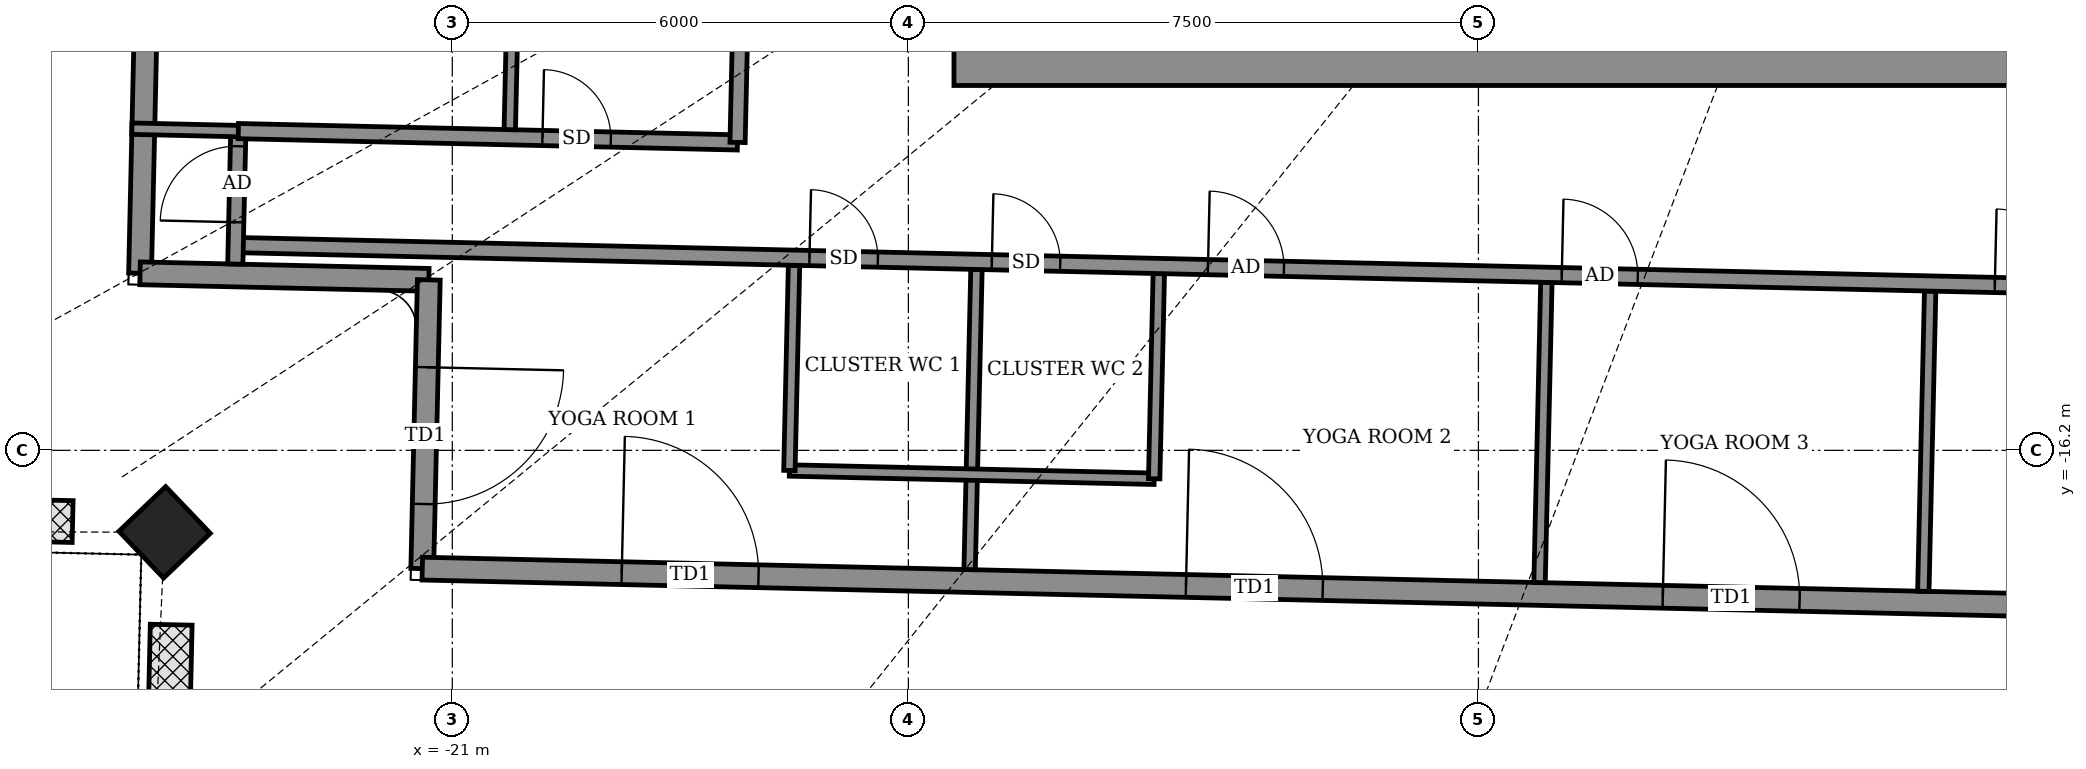
"""IFC4 building model, lengths in metres.
Left out: names, types, materials, properties, quantities, classifications, styles, units other than length and angle.
Written with IfcOpenShell. Run it as: python <this file> out.ifc"""

import sys

from ifc_helpers import new_model, si_unit, direction, frame, frame_2d, origin, origin_2d, place, context, subcontext, project, spatial, rectangle, extrude, element, fill, save


model = new_model("IFC4")
c1 = context("Model", 3, precision=1e-05, world=origin(), true_north=direction((0.0, 1.0)))
c2 = subcontext(c1, "Body", "Model", "MODEL_VIEW")
j1 = project(units=[si_unit("LENGTHUNIT", "METRE"), si_unit("PLANEANGLEUNIT", "RADIAN")], contexts=[c1])
p1 = place(None, origin())
s1 = spatial("IfcSite", under=j1, at=p1, CompositionType="ELEMENT")
p2 = place(p1, origin())
s2 = spatial("IfcBuilding", under=s1, at=p2, CompositionType="ELEMENT")
p3 = place(p2, frame((0.0, 0.0, 337.9)))
s3 = spatial("IfcBuildingStorey", under=s2, at=p3, CompositionType="ELEMENT", Elevation=337.9)
p4 = place(p3, frame((-24.785, -17.278, -0.55), z_axis=(0.0, 0.0, 1.0), x_axis=(0.690837236726, -0.723010312757, 0.0)))
e1 = element("IfcColumn", 1, at=p4, inside=s3, PredefinedType="COLUMN", context=c2, shape_type="SweptSolid", body=[
    extrude(rectangle(XDim=0.85, YDim=0.85, at=origin_2d()), origin(), (0.0, 0.0, 1.0), 4.6),
])
p5 = place(p3, frame((-24.899, -4.644, 0.0), z_axis=(0.0, 0.0, 1.0), x_axis=(-0.022643290689, -0.999743607825, 0.0)))
e2 = element("IfcWall", 2, at=p5, inside=s3, PredefinedType="SOLIDWALL", context=c2, shape_type="SweptSolid", body=[
    extrude(rectangle(XDim=9.229, YDim=0.3, at=frame_2d((4.615, 0.0))), origin(), (0.0, 0.0, 1.0), 2.45),
])
p6 = place(p5, frame((2.792, 0.0, 0.0)))
e3 = element("IfcOpeningElement", 3, at=p6, cuts=e2, PredefinedType="OPENING", context=c2, shape_type="SweptSolid", body=[
    extrude(rectangle(XDim=1.8, YDim=2.4, at=frame_2d((0.9, 1.2))), frame((0.0, 0.16, 0.0), z_axis=(0.0, -1.0, 0.0), x_axis=(1.0, 0.0, 0.0)), (0.0, 0.0, 1.0), 0.32),
])
p7 = place(p3, frame((-25.108, -13.871, 0.0), z_axis=(0.0, 0.0, 1.0), x_axis=(0.999744218285, -0.022616321648, 0.0)))
e4 = element("IfcWall", 4, at=p7, inside=s3, PredefinedType="SOLIDWALL", context=c2, shape_type="SweptSolid", body=[
    extrude(rectangle(XDim=3.8, YDim=0.3, at=frame_2d((1.9, 0.0))), origin(), (0.0, 0.0, 1.0), 2.45),
])
p8 = place(p3, frame((-21.309, -13.957, 0.0), z_axis=(0.0, 0.0, 1.0), x_axis=(-0.022614868993, -0.999744251146, 0.0)))
e5 = element("IfcWall", 5, at=p8, inside=s3, PredefinedType="SOLIDWALL", context=c2, shape_type="SweptSolid", body=[
    extrude(rectangle(XDim=3.8, YDim=0.3, at=frame_2d((1.9, 0.0))), origin(), (0.0, 0.0, 1.0), 2.65),
])
p9 = place(p8, frame((1.15, 0.0, 0.0)))
e6 = element("IfcOpeningElement", 6, at=p9, cuts=e5, PredefinedType="OPENING", context=c2, shape_type="SweptSolid", body=[
    extrude(rectangle(XDim=1.8, YDim=2.4, at=frame_2d((0.9, 1.2))), frame((0.0, 0.16, 0.0), z_axis=(0.0, -1.0, 0.0), x_axis=(1.0, 0.0, 0.0)), (0.0, 0.0, 1.0), 0.32),
])
p10 = place(p3, frame((-21.395, -17.756, 0.0), z_axis=(0.0, 0.0, 1.0), x_axis=(0.999742664636, -0.022684895998, 0.0)))
e7 = element("IfcWall", 7, at=p10, inside=s3, PredefinedType="SOLIDWALL", context=c2, shape_type="SweptSolid", body=[
    extrude(rectangle(XDim=43.899, YDim=0.3, at=frame_2d((21.95, 0.0))), origin(), (0.0, 0.0, 1.0), 2.65),
])
p11 = place(p10, frame((2.625, 0.0, 0.0)))
e8 = element("IfcOpeningElement", 8, at=p11, cuts=e7, PredefinedType="OPENING", context=c2, shape_type="SweptSolid", body=[
    extrude(rectangle(XDim=1.8, YDim=2.4, at=frame_2d((0.9, 1.2))), frame((0.0, 0.16, 0.0), z_axis=(0.0, -1.0, 0.0), x_axis=(1.0, 0.0, 0.0)), (0.0, 0.0, 1.0), 0.32),
])
p12 = place(p10, frame((10.05, 0.0, 0.0)))
e9 = element("IfcOpeningElement", 9, at=p12, cuts=e7, PredefinedType="OPENING", context=c2, shape_type="SweptSolid", body=[
    extrude(rectangle(XDim=1.8, YDim=2.4, at=frame_2d((0.9, 1.2))), frame((0.0, 0.16, 0.0), z_axis=(0.0, -1.0, 0.0), x_axis=(1.0, 0.0, 0.0)), (0.0, 0.0, 1.0), 0.32),
])
p13 = place(p10, frame((16.325, 0.0, 0.0)))
e10 = element("IfcOpeningElement", 10, at=p13, cuts=e7, PredefinedType="OPENING", context=c2, shape_type="SweptSolid", body=[
    extrude(rectangle(XDim=1.8, YDim=2.4, at=frame_2d((0.9, 1.2))), frame((0.0, 0.16, 0.0), z_axis=(0.0, -1.0, 0.0), x_axis=(1.0, 0.0, 0.0)), (0.0, 0.0, 1.0), 0.32),
])
p14 = place(p10, frame((22.15, 0.0, 0.0)))
e11 = element("IfcOpeningElement", 11, at=p14, cuts=e7, PredefinedType="OPENING", context=c2, shape_type="SweptSolid", body=[
    extrude(rectangle(XDim=1.8, YDim=2.4, at=frame_2d((0.9, 1.2))), frame((0.0, 0.16, 0.0), z_axis=(0.0, -1.0, 0.0), x_axis=(1.0, 0.0, 0.0)), (0.0, 0.0, 1.0), 0.32),
])
p15 = place(p10, frame((28.35, 0.0, 0.0)))
e12 = element("IfcOpeningElement", 12, at=p15, cuts=e7, PredefinedType="OPENING", context=c2, shape_type="SweptSolid", body=[
    extrude(rectangle(XDim=1.8, YDim=2.4, at=frame_2d((0.9, 1.2))), frame((0.0, 0.16, 0.0), z_axis=(0.0, -1.0, 0.0), x_axis=(1.0, 0.0, 0.0)), (0.0, 0.0, 1.0), 0.32),
])
p16 = place(p10, frame((34.075, 0.0, 0.0)))
e13 = element("IfcOpeningElement", 13, at=p16, cuts=e7, PredefinedType="OPENING", context=c2, shape_type="SweptSolid", body=[
    extrude(rectangle(XDim=1.8, YDim=2.4, at=frame_2d((0.9, 1.2))), frame((0.0, 0.16, 0.0), z_axis=(0.0, -1.0, 0.0), x_axis=(1.0, 0.0, 0.0)), (0.0, 0.0, 1.0), 0.32),
])
p17 = place(p10, frame((39.6, 0.0, 0.0)))
e14 = element("IfcOpeningElement", 14, at=p17, cuts=e7, PredefinedType="OPENING", context=c2, shape_type="SweptSolid", body=[
    extrude(rectangle(XDim=1.8, YDim=2.4, at=frame_2d((0.9, 1.2))), frame((0.0, 0.16, 0.0), z_axis=(0.0, -1.0, 0.0), x_axis=(1.0, 0.0, 0.0)), (0.0, 0.0, 1.0), 0.32),
])
p18 = place(p3, frame((-24.734, -20.081, 0.0), z_axis=(0.0, 0.0, 1.0), x_axis=(0.022606127362, 0.99974444885, 0.0)))
e15 = element("IfcWall", 15, at=p18, inside=s3, PredefinedType="USERDEFINED", context=c2, shape_type="SweptSolid", body=[
    extrude(rectangle(XDim=1.588, YDim=0.55, at=frame_2d((0.794, 0.0))), origin(), (0.0, 0.0, 1.0), 0.8),
])
p19 = place(p3, frame((-25.995, -17.137, 0.0), z_axis=(0.0, 0.0, 1.0), x_axis=(-0.999742081457, 0.022710582629, 0.0)))
e16 = element("IfcWall", 16, at=p19, inside=s3, PredefinedType="USERDEFINED", context=c2, shape_type="SweptSolid", body=[
    extrude(rectangle(XDim=1.537, YDim=0.55, at=frame_2d((0.769, 0.0))), origin(), (0.0, 0.0, 1.0), 0.8),
])
p20 = place(p3, frame((-14.194, -17.769, 0.0), z_axis=(0.0, 0.0, 1.0), x_axis=(0.022807049009, 0.999739885428, 0.0)))
e17 = element("IfcWall", 17, at=p20, inside=s3, PredefinedType="PARTITIONING", context=c2, shape_type="SweptSolid", body=[
    extrude(rectangle(XDim=3.95, YDim=0.15, at=frame_2d((1.975, 0.0))), origin(), (0.0, 0.0, 1.0), 2.85),
])
p21 = place(p3, frame((-6.696, -17.94, 0.0), z_axis=(0.0, 0.0, 1.0), x_axis=(0.022801413262, 0.99974001398, 0.0)))
e18 = element("IfcWall", 18, at=p21, inside=s3, PredefinedType="PARTITIONING", context=c2, shape_type="SweptSolid", body=[
    extrude(rectangle(XDim=3.951, YDim=0.15, at=frame_2d((1.976, 0.0))), origin(), (0.0, 0.0, 1.0), 2.85),
])
p22 = place(p3, frame((-1.647, -18.054, 0.0), z_axis=(0.0, 0.0, 1.0), x_axis=(0.022807049009, 0.999739885428, 0.0)))
e19 = element("IfcWall", 19, at=p22, inside=s3, PredefinedType="PARTITIONING", context=c2, shape_type="SweptSolid", body=[
    extrude(rectangle(XDim=3.95, YDim=0.15, at=frame_2d((1.975, 0.0))), origin(), (0.0, 0.0, 1.0), 4.05),
])
p23 = place(p3, frame((-16.565, -16.465, 0.0), z_axis=(0.0, 0.0, 1.0), x_axis=(0.999742675121, -0.022684433919, 0.0)))
e20 = element("IfcWall", 20, at=p23, inside=s3, PredefinedType="PARTITIONING", context=c2, shape_type="SweptSolid", body=[
    extrude(rectangle(XDim=4.8, YDim=0.15, at=frame_2d((2.4, 0.0))), origin(), (0.0, 0.0, 1.0), 2.85),
])
p24 = place(p3, frame((-16.565, -16.465, 0.0), z_axis=(0.0, 0.0, 1.0), x_axis=(0.02260842146, 0.999744396973, 0.0)))
e21 = element("IfcWall", 21, at=p24, inside=s3, PredefinedType="PARTITIONING", context=c2, shape_type="SweptSolid", body=[
    extrude(rectangle(XDim=2.7, YDim=0.15, at=frame_2d((1.35, 0.0))), origin(), (0.0, 0.0, 1.0), 2.65),
])
p25 = place(p3, frame((-11.766, -16.574, 0.0), z_axis=(0.0, 0.0, 1.0), x_axis=(0.02260842146, 0.999744396973, 0.0)))
e22 = element("IfcWall", 22, at=p25, inside=s3, PredefinedType="PARTITIONING", context=c2, shape_type="SweptSolid", body=[
    extrude(rectangle(XDim=2.7, YDim=0.15, at=frame_2d((1.35, 0.0))), origin(), (0.0, 0.0, 1.0), 2.85),
])
p26 = place(p3, frame((-23.849, -13.499, 0.0), z_axis=(0.0, 0.0, 1.0), x_axis=(0.999742429398, -0.022695260756, 0.0)))
e23 = element("IfcWall", 23, at=p26, inside=s3, PredefinedType="PARTITIONING", context=c2, shape_type="SweptSolid", body=[
    extrude(rectangle(XDim=49.0, YDim=0.2, at=frame_2d((24.5, 0.0))), origin(), (0.0, 0.0, 1.0), 2.45),
])
p27 = place(p26, frame((7.55, 0.0, 0.0)))
e24 = element("IfcOpeningElement", 24, at=p27, cuts=e23, PredefinedType="OPENING", context=c2, shape_type="SweptSolid", body=[
    extrude(rectangle(XDim=0.9, YDim=2.1, at=frame_2d((0.45, 1.05))), frame((0.0, 0.11, 0.0), z_axis=(0.0, -1.0, 0.0), x_axis=(1.0, 0.0, 0.0)), (0.0, 0.0, 1.0), 0.22),
])
p28 = place(p26, frame((12.794, 0.0, 0.0)))
e25 = element("IfcOpeningElement", 25, at=p28, cuts=e23, PredefinedType="OPENING", context=c2, shape_type="SweptSolid", body=[
    extrude(rectangle(XDim=1.0, YDim=2.1, at=frame_2d((0.5, 1.05))), frame((0.0, 0.11, 0.0), z_axis=(0.0, -1.0, 0.0), x_axis=(1.0, 0.0, 0.0)), (0.0, 0.0, 1.0), 0.22),
])
p29 = place(p26, frame((9.95, 0.0, 0.0)))
e26 = element("IfcOpeningElement", 26, at=p29, cuts=e23, PredefinedType="OPENING", context=c2, shape_type="SweptSolid", body=[
    extrude(rectangle(XDim=0.9, YDim=2.1, at=frame_2d((0.45, 1.05))), frame((0.0, 0.11, 0.0), z_axis=(0.0, -1.0, 0.0), x_axis=(1.0, 0.0, 0.0)), (0.0, 0.0, 1.0), 0.22),
])
p30 = place(p26, frame((17.45, 0.0, 0.0)))
e27 = element("IfcOpeningElement", 27, at=p30, cuts=e23, PredefinedType="OPENING", context=c2, shape_type="SweptSolid", body=[
    extrude(rectangle(XDim=1.0, YDim=2.1, at=frame_2d((0.5, 1.05))), frame((0.0, 0.11, 0.0), z_axis=(0.0, -1.0, 0.0), x_axis=(1.0, 0.0, 0.0)), (0.0, 0.0, 1.0), 0.22),
])
p31 = place(p26, frame((23.149, 0.0, 0.0)))
e28 = element("IfcOpeningElement", 28, at=p31, cuts=e23, PredefinedType="OPENING", context=c2, shape_type="SweptSolid", body=[
    extrude(rectangle(XDim=1.0, YDim=2.1, at=frame_2d((0.5, 1.05))), frame((0.0, 0.11, 0.0), z_axis=(0.0, -1.0, 0.0), x_axis=(1.0, 0.0, 0.0)), (0.0, 0.0, 1.0), 0.22),
])
p32 = place(p26, frame((29.1, 0.0, 0.0)))
e29 = element("IfcOpeningElement", 29, at=p32, cuts=e23, PredefinedType="OPENING", context=c2, shape_type="SweptSolid", body=[
    extrude(rectangle(XDim=1.0, YDim=2.1, at=frame_2d((0.5, 1.05))), frame((0.0, 0.11, 0.0), z_axis=(0.0, -1.0, 0.0), x_axis=(1.0, 0.0, 0.0)), (0.0, 0.0, 1.0), 0.22),
])
p33 = place(p26, frame((32.5, 0.0, 0.0)))
e30 = element("IfcOpeningElement", 30, at=p33, cuts=e23, PredefinedType="OPENING", context=c2, shape_type="SweptSolid", body=[
    extrude(rectangle(XDim=0.9, YDim=2.1, at=frame_2d((0.45, 1.05))), frame((0.0, 0.11, 0.0), z_axis=(0.0, -1.0, 0.0), x_axis=(1.0, 0.0, 0.0)), (0.0, 0.0, 1.0), 0.22),
])
p34 = place(p26, frame((37.5, 0.0, 0.0)))
e31 = element("IfcOpeningElement", 31, at=p34, cuts=e23, PredefinedType="OPENING", context=c2, shape_type="SweptSolid", body=[
    extrude(rectangle(XDim=1.0, YDim=2.1, at=frame_2d((0.5, 1.05))), frame((0.0, 0.11, 0.0), z_axis=(0.0, -1.0, 0.0), x_axis=(1.0, 0.0, 0.0)), (0.0, 0.0, 1.0), 0.22),
])
p35 = place(p26, frame((34.9, 0.0, 0.0)))
e32 = element("IfcOpeningElement", 32, at=p35, cuts=e23, PredefinedType="OPENING", context=c2, shape_type="SweptSolid", body=[
    extrude(rectangle(XDim=0.9, YDim=2.1, at=frame_2d((0.45, 1.05))), frame((0.0, 0.11, 0.0), z_axis=(0.0, -1.0, 0.0), x_axis=(1.0, 0.0, 0.0)), (0.0, 0.0, 1.0), 0.22),
])
p36 = place(p26, frame((44.213, 0.0, 0.0)))
e33 = element("IfcOpeningElement", 33, at=p36, cuts=e23, PredefinedType="OPENING", context=c2, shape_type="SweptSolid", body=[
    extrude(rectangle(XDim=1.0, YDim=2.1, at=frame_2d((0.5, 1.05))), frame((0.0, 0.11, 0.0), z_axis=(0.0, -1.0, 0.0), x_axis=(1.0, 0.0, 0.0)), (0.0, 0.0, 1.0), 0.22),
])
p37 = place(p26, frame((40.55, 0.0, 0.0)))
e34 = element("IfcOpeningElement", 34, at=p37, cuts=e23, PredefinedType="OPENING", context=c2, shape_type="SweptSolid", body=[
    extrude(rectangle(XDim=0.9, YDim=2.1, at=frame_2d((0.45, 1.05))), frame((0.0, 0.11, 0.0), z_axis=(0.0, -1.0, 0.0), x_axis=(1.0, 0.0, 0.0)), (0.0, 0.0, 1.0), 0.22),
])
p38 = place(p3, frame((-23.855, -13.749, 0.0), z_axis=(0.0, 0.0, 1.0), x_axis=(0.022886242938, 0.99973807564, 0.0)))
e35 = element("IfcWall", 35, at=p38, inside=s3, PredefinedType="PARTITIONING", context=c2, shape_type="SweptSolid", body=[
    extrude(rectangle(XDim=1.75, YDim=0.2, at=frame_2d((0.875, 0.0))), origin(), (0.0, 0.0, 1.0), 2.45),
])
p39 = place(p38, frame((0.55, 0.0, 0.0)))
e36 = element("IfcOpeningElement", 36, at=p39, cuts=e35, PredefinedType="OPENING", context=c2, shape_type="SweptSolid", body=[
    extrude(rectangle(XDim=1.0, YDim=2.1, at=frame_2d((0.5, 1.05))), frame((0.0, 0.11, 0.0), z_axis=(0.0, -1.0, 0.0), x_axis=(1.0, 0.0, 0.0)), (0.0, 0.0, 1.0), 0.22),
])
p40 = place(p3, frame((-25.215, -11.968, 0.0), z_axis=(0.0, 0.0, 1.0), x_axis=(0.999740667531, -0.022772739949, 0.0)))
e37 = element("IfcWall", 37, at=p40, inside=s3, PredefinedType="PARTITIONING", context=c2, shape_type="SweptSolid", body=[
    extrude(rectangle(XDim=1.404, YDim=0.15, at=frame_2d((0.702, 0.0))), origin(), (0.0, 0.0, 1.0), 4.05),
])
p41 = place(p3, frame((-23.815, -12.0, 0.0), z_axis=(0.0, 0.0, 1.0), x_axis=(0.999742947273, -0.022672436532, 0.0)))
e38 = element("IfcWall", 38, at=p41, inside=s3, PredefinedType="PARTITIONING", context=c2, shape_type="SweptSolid", body=[
    extrude(rectangle(XDim=6.569, YDim=0.2, at=frame_2d((3.284, 0.0))), origin(), (0.0, 0.0, 1.0), 2.45),
])
p42 = place(p41, frame((4.002, 0.0, 0.0)))
e39 = element("IfcOpeningElement", 39, at=p42, cuts=e38, PredefinedType="OPENING", context=c2, shape_type="SweptSolid", body=[
    extrude(rectangle(XDim=0.9, YDim=2.1, at=frame_2d((0.45, 1.05))), frame((0.0, 0.11, 0.0), z_axis=(0.0, -1.0, 0.0), x_axis=(1.0, 0.0, 0.0)), (0.0, 0.0, 1.0), 0.22),
])
p43 = place(p3, frame((-20.244, -11.981, 0.0), z_axis=(0.0, 0.0, 1.0), x_axis=(0.02274801823, 0.999741230352, 0.0)))
e40 = element("IfcWall", 40, at=p43, inside=s3, PredefinedType="PARTITIONING", context=c2, shape_type="SweptSolid", body=[
    extrude(rectangle(XDim=2.501, YDim=0.15, at=frame_2d((1.25, 0.0))), origin(), (0.0, 0.0, 1.0), 2.45),
])
p44 = place(p3, frame((-17.247, -12.149, 0.0), z_axis=(0.0, 0.0, 1.0), x_axis=(0.022696191528, 0.999742408268, 0.0)))
e41 = element("IfcWall", 41, at=p44, inside=s3, PredefinedType="PARTITIONING", context=c2, shape_type="SweptSolid", body=[
    extrude(rectangle(XDim=25.074, YDim=0.2, at=frame_2d((12.537, 0.0))), origin(), (0.0, 0.0, 1.0), 2.45),
])
p45 = place(p44, frame((19.097, 0.0, 0.0)))
e42 = element("IfcOpeningElement", 42, at=p45, cuts=e41, PredefinedType="OPENING", context=c2, shape_type="SweptSolid", body=[
    extrude(rectangle(XDim=1.0, YDim=2.1, at=frame_2d((0.5, 1.05))), frame((0.0, 0.11, 0.0), z_axis=(0.0, -1.0, 0.0), x_axis=(1.0, 0.0, 0.0)), (0.0, 0.0, 1.0), 0.22),
])
p46 = place(p44, frame((12.875, 0.0, 0.0)))
e43 = element("IfcOpeningElement", 43, at=p46, cuts=e41, PredefinedType="OPENING", context=c2, shape_type="SweptSolid", body=[
    extrude(rectangle(XDim=1.0, YDim=2.1, at=frame_2d((0.5, 1.05))), frame((0.0, 0.11, 0.0), z_axis=(0.0, -1.0, 0.0), x_axis=(1.0, 0.0, 0.0)), (0.0, 0.0, 1.0), 0.22),
])
p47 = place(p44, frame((8.775, 0.0, 0.0)))
e44 = element("IfcOpeningElement", 44, at=p47, cuts=e41, PredefinedType="OPENING", context=c2, shape_type="SweptSolid", body=[
    extrude(rectangle(XDim=0.9, YDim=2.1, at=frame_2d((0.45, 1.05))), frame((0.0, 0.11, 0.0), z_axis=(0.0, -1.0, 0.0), x_axis=(1.0, 0.0, 0.0)), (0.0, 0.0, 1.0), 0.22),
])
p48 = place(p44, frame((6.075, 0.0, 0.0)))
e45 = element("IfcOpeningElement", 45, at=p48, cuts=e41, PredefinedType="OPENING", context=c2, shape_type="SweptSolid", body=[
    extrude(rectangle(XDim=1.0, YDim=2.1, at=frame_2d((0.5, 1.05))), frame((0.0, 0.11, 0.0), z_axis=(0.0, -1.0, 0.0), x_axis=(1.0, 0.0, 0.0)), (0.0, 0.0, 1.0), 0.22),
])
p49 = place(p3, frame((-14.4, -11.1, 0.0), z_axis=(0.0, 0.0, 1.0), x_axis=(1.0, 0.0, 0.0)))
e46 = element("IfcWall", 46, at=p49, inside=s3, PredefinedType="SHEAR", context=c2, shape_type="SweptSolid", body=[
    extrude(rectangle(XDim=28.8, YDim=0.6, at=frame_2d((14.4, 0.0))), origin(), (0.0, 0.0, 1.0), 4.6),
])
p50 = place(p9, origin())
e47 = element("IfcDoor", 47, at=p50, inside=s3, OperationType="DOUBLE_DOOR_SINGLE_SWING", PredefinedType="DOOR", context=c2, shape_type="SweptSolid", body=[
    extrude(rectangle(XDim=1.8, YDim=2.4, at=frame_2d((0.9, 1.2))), frame((0.0, 0.025, 0.0), z_axis=(0.0, -1.0, 0.0), x_axis=(1.0, 0.0, 0.0)), (0.0, 0.0, 1.0), 0.05),
])
fill(e6, e47)
p51 = place(p11, origin())
e48 = element("IfcDoor", 48, at=p51, inside=s3, OperationType="DOUBLE_DOOR_SINGLE_SWING", PredefinedType="DOOR", context=c2, shape_type="SweptSolid", body=[
    extrude(rectangle(XDim=1.8, YDim=2.4, at=frame_2d((0.9, 1.2))), frame((0.0, 0.025, 0.0), z_axis=(0.0, -1.0, 0.0), x_axis=(1.0, 0.0, 0.0)), (0.0, 0.0, 1.0), 0.05),
])
fill(e8, e48)
p52 = place(p12, origin())
e49 = element("IfcDoor", 49, at=p52, inside=s3, OperationType="DOUBLE_DOOR_SINGLE_SWING", PredefinedType="DOOR", context=c2, shape_type="SweptSolid", body=[
    extrude(rectangle(XDim=1.8, YDim=2.4, at=frame_2d((0.9, 1.2))), frame((0.0, 0.025, 0.0), z_axis=(0.0, -1.0, 0.0), x_axis=(1.0, 0.0, 0.0)), (0.0, 0.0, 1.0), 0.05),
])
fill(e9, e49)
p53 = place(p13, origin())
e50 = element("IfcDoor", 50, at=p53, inside=s3, OperationType="DOUBLE_DOOR_SINGLE_SWING", PredefinedType="DOOR", context=c2, shape_type="SweptSolid", body=[
    extrude(rectangle(XDim=1.8, YDim=2.4, at=frame_2d((0.9, 1.2))), frame((0.0, 0.025, 0.0), z_axis=(0.0, -1.0, 0.0), x_axis=(1.0, 0.0, 0.0)), (0.0, 0.0, 1.0), 0.05),
])
fill(e10, e50)
p54 = place(p39, origin())
e51 = element("IfcDoor", 51, at=p54, inside=s3, OperationType="SINGLE_SWING_LEFT", PredefinedType="DOOR", context=c2, shape_type="SweptSolid", body=[
    extrude(rectangle(XDim=1.0, YDim=2.1, at=frame_2d((0.5, 1.05))), frame((0.0, 0.025, 0.0), z_axis=(0.0, -1.0, 0.0), x_axis=(1.0, 0.0, 0.0)), (0.0, 0.0, 1.0), 0.05),
])
fill(e36, e51)
p55 = place(p27, origin())
e52 = element("IfcDoor", 52, at=p55, inside=s3, OperationType="SINGLE_SWING_LEFT", PredefinedType="DOOR", context=c2, shape_type="SweptSolid", body=[
    extrude(rectangle(XDim=0.9, YDim=2.1, at=frame_2d((0.45, 1.05))), frame((0.0, 0.025, 0.0), z_axis=(0.0, -1.0, 0.0), x_axis=(1.0, 0.0, 0.0)), (0.0, 0.0, 1.0), 0.05),
])
fill(e24, e52)
p56 = place(p28, origin())
e53 = element("IfcDoor", 53, at=p56, inside=s3, OperationType="SINGLE_SWING_RIGHT", PredefinedType="DOOR", context=c2, shape_type="SweptSolid", body=[
    extrude(rectangle(XDim=1.0, YDim=2.1, at=frame_2d((0.5, 1.05))), frame((0.0, 0.025, 0.0), z_axis=(0.0, -1.0, 0.0), x_axis=(1.0, 0.0, 0.0)), (0.0, 0.0, 1.0), 0.05),
])
fill(e25, e53)
p57 = place(p29, origin())
e54 = element("IfcDoor", 54, at=p57, inside=s3, OperationType="SINGLE_SWING_RIGHT", PredefinedType="DOOR", context=c2, shape_type="SweptSolid", body=[
    extrude(rectangle(XDim=0.9, YDim=2.1, at=frame_2d((0.45, 1.05))), frame((0.0, 0.025, 0.0), z_axis=(0.0, -1.0, 0.0), x_axis=(1.0, 0.0, 0.0)), (0.0, 0.0, 1.0), 0.05),
])
fill(e26, e54)
p58 = place(p30, origin())
e55 = element("IfcDoor", 55, at=p58, inside=s3, OperationType="SINGLE_SWING_LEFT", PredefinedType="DOOR", context=c2, shape_type="SweptSolid", body=[
    extrude(rectangle(XDim=1.0, YDim=2.1, at=frame_2d((0.5, 1.05))), frame((0.0, 0.025, 0.0), z_axis=(0.0, -1.0, 0.0), x_axis=(1.0, 0.0, 0.0)), (0.0, 0.0, 1.0), 0.05),
])
fill(e27, e55)
p59 = place(p31, origin())
e56 = element("IfcDoor", 56, at=p59, inside=s3, OperationType="SINGLE_SWING_RIGHT", PredefinedType="DOOR", context=c2, shape_type="SweptSolid", body=[
    extrude(rectangle(XDim=1.0, YDim=2.1, at=frame_2d((0.5, 1.05))), frame((0.0, 0.025, 0.0), z_axis=(0.0, -1.0, 0.0), x_axis=(1.0, 0.0, 0.0)), (0.0, 0.0, 1.0), 0.05),
])
fill(e28, e56)
p60 = place(p42, origin())
e57 = element("IfcDoor", 57, at=p60, inside=s3, OperationType="SINGLE_SWING_LEFT", PredefinedType="DOOR", context=c2, shape_type="SweptSolid", body=[
    extrude(rectangle(XDim=0.9, YDim=2.1, at=frame_2d((0.45, 1.05))), frame((0.0, 0.025, 0.0), z_axis=(0.0, -1.0, 0.0), x_axis=(1.0, 0.0, 0.0)), (0.0, 0.0, 1.0), 0.05),
])
fill(e39, e57)
save(model, sys.argv[1])
